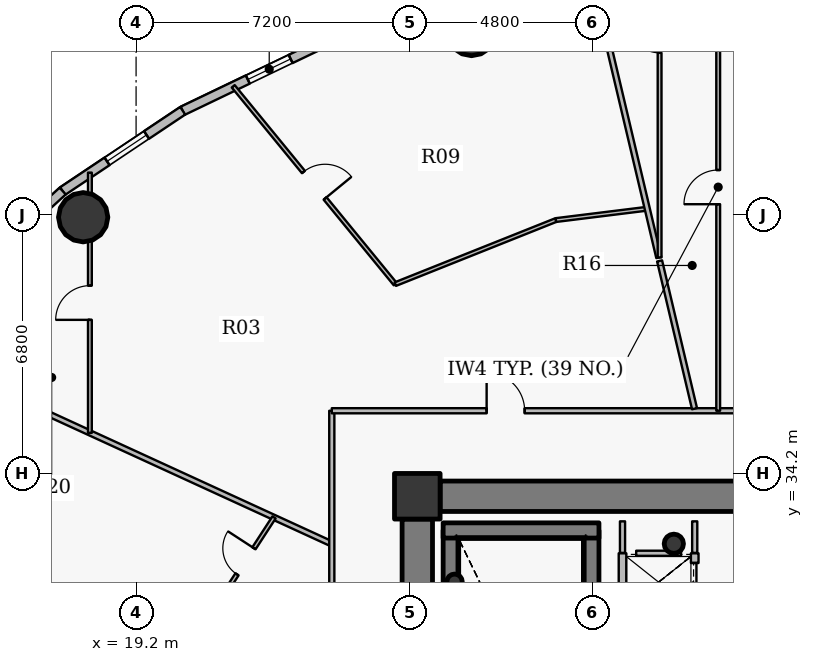
"""IFC4 building model, lengths in metres.
Left out: names, types, materials, properties, quantities, classifications, styles, units other than length and angle.
Written with IfcOpenShell. Run it as: python <this file> out.ifc"""

import sys

from ifc_helpers import new_model, si_unit, direction, frame, frame_2d, origin, origin_2d, place, context, subcontext, project, spatial, rectangle, hollow_circle, extrude, source, transform, mapped, element, fill, save


model = new_model("IFC4")
c1 = context("Model", 3, precision=1e-05, world=origin(), true_north=direction((0.0, 1.0)))
c2 = subcontext(c1, "Body", "Model", "MODEL_VIEW")
j1 = project(units=[si_unit("LENGTHUNIT", "METRE"), si_unit("PLANEANGLEUNIT", "RADIAN")], contexts=[c1])
p1 = place(None, origin())
s1 = spatial("IfcSite", under=j1, at=p1, CompositionType="ELEMENT")
p2 = place(p1, origin())
s2 = spatial("IfcBuilding", under=s1, at=p2, CompositionType="ELEMENT")
p3 = place(p2, frame((0.0, 0.0, 159.9)))
s3 = spatial("IfcBuildingStorey", under=s2, at=p3, CompositionType="ELEMENT", Elevation=159.9)
p4 = place(p3, frame((26.6, 33.6, 0.0), z_axis=(0.0, 0.0, 1.0), x_axis=(1.0, 0.0, 0.0)))
e1 = element("IfcColumn", 1, at=p4, inside=s3, PredefinedType="COLUMN", context=c2, shape_type="SweptSolid", body=[
    extrude(rectangle(XDim=1.2, YDim=1.2, at=origin_2d()), origin(), (0.0, 0.0, 1.0), 3.75),
])
p5 = place(p3, frame((33.35, 32.35, 0.0), z_axis=(0.0, 0.0, 1.0), x_axis=(1.0, 0.0, 0.0)))
e2 = element("IfcColumn", 2, at=p5, inside=s3, PredefinedType="COLUMN", context=c2, shape_type="SweptSolid", body=[
    extrude(hollow_circle(Radius=0.254, WallThickness=0.02, at=origin_2d()), origin(), (0.0, 0.0, 1.0), 3.75),
])
p6 = place(p3, frame((27.48, 24.1, 0.0), z_axis=(0.0, 0.0, 1.0), x_axis=(0.0, 1.0, 0.0)))
e3 = element("IfcWall", 3, at=p6, inside=s3, PredefinedType="SHEAR", context=c2, shape_type="SweptSolid", body=[
    extrude(rectangle(XDim=8.6, YDim=0.4, at=frame_2d((4.3, 0.0))), origin(), (0.0, 0.0, 1.0), 3.75),
])
p7 = place(p3, frame((31.18, 27.8, 0.0), z_axis=(0.0, 0.0, 1.0), x_axis=(0.0, 1.0, 0.0)))
e4 = element("IfcWall", 4, at=p7, inside=s3, PredefinedType="SHEAR", context=c2, shape_type="SweptSolid", body=[
    extrude(rectangle(XDim=4.9, YDim=0.4, at=frame_2d((2.45, 0.0))), origin(), (0.0, 0.0, 1.0), 3.75),
])
p8 = place(p3, frame((27.28, 32.7, 0.0), z_axis=(0.0, 0.0, 1.0), x_axis=(1.0, 0.0, 0.0)))
e5 = element("IfcWall", 5, at=p8, inside=s3, PredefinedType="SHEAR", context=c2, shape_type="SweptSolid", body=[
    extrude(rectangle(XDim=4.1, YDim=0.4, at=frame_2d((2.05, 0.0))), origin(), (0.0, 0.0, 1.0), 3.75),
])
p9 = place(p3, frame((27.58, 31.35, 0.0), z_axis=(0.0, 0.0, 1.0), x_axis=(1.0, 0.0, 0.0)))
e6 = element("IfcColumn", 6, at=p9, inside=s3, PredefinedType="COLUMN", context=c2, shape_type="SweptSolid", body=[
    extrude(hollow_circle(Radius=0.203, WallThickness=0.016, at=origin_2d()), origin(), (0.0, 0.0, 1.0), 3.75),
])
p10 = place(p3, frame((27.2, 33.6, 0.0), z_axis=(0.0, 0.0, 1.0), x_axis=(1.0, 0.0, 0.0)))
e7 = element("IfcWall", 7, at=p10, inside=s3, PredefinedType="SHEAR", context=c2, shape_type="SweptSolid", body=[
    extrude(rectangle(XDim=17.6, YDim=0.8, at=frame_2d((8.8, 0.0))), origin(), (0.0, 0.0, 1.0), 2.95),
])
p11 = place(p10, frame((13.45, 0.0, 0.0)))
e8 = element("IfcOpeningElement", 8, at=p11, cuts=e7, PredefinedType="OPENING", context=c2, shape_type="SweptSolid", body=[
    extrude(rectangle(XDim=1.15, YDim=2.15, at=origin_2d()), frame((0.575, 0.41, 1.075), z_axis=(0.0, -1.0, 0.0), x_axis=(1.0, 0.0, 0.0)), (0.0, 0.0, 1.0), 0.82),
])
p12 = place(p3, frame((26.6, 21.0, 0.0), z_axis=(0.0, 0.0, 1.0), x_axis=(0.0, 1.0, 0.0)))
e9 = element("IfcWall", 9, at=p12, inside=s3, PredefinedType="SHEAR", context=c2, shape_type="SweptSolid", body=[
    extrude(rectangle(XDim=12.0, YDim=0.8, at=frame_2d((6.0, 0.0))), origin(), (0.0, 0.0, 1.0), 2.95),
])
p13 = place(p12, frame((1.061, 0.0, 0.0)))
e10 = element("IfcOpeningElement", 10, at=p13, cuts=e9, PredefinedType="OPENING", context=c2, shape_type="SweptSolid", body=[
    extrude(rectangle(XDim=1.15, YDim=2.15, at=origin_2d()), frame((0.575, 0.41, 1.075), z_axis=(0.0, -1.0, 0.0), x_axis=(1.0, 0.0, 0.0)), (0.0, 0.0, 1.0), 0.82),
])
for number, where, z_axis, x_axis in (
    (11, (28.027, 45.841, 0.0), (0.0, 0.0, 1.0), (1.0, 0.0, 0.0)),
    (12, (17.808, 40.942, 0.0), (0.0, 0.0, 1.0), (1.0, 0.0, 0.0)),
):
    element("IfcColumn", number, at=place(p3, frame(where, z_axis=z_axis, x_axis=x_axis)), inside=s3, PredefinedType="COLUMN", context=c2, shape_type="SweptSolid", body=[
        extrude(hollow_circle(Radius=0.65, WallThickness=0.04, at=origin_2d()), origin(), (0.0, 0.0, 1.0), 3.75),
    ])
p14 = place(p3, frame((20.427, 43.743, 0.0), z_axis=(0.0, 0.0, 1.0), x_axis=(0.901564733809, 0.432644231155, 0.0)))
e13 = element("IfcWall", 13, at=p14, inside=s3, PredefinedType="SOLIDWALL", context=c2, shape_type="SweptSolid", body=[
    extrude(rectangle(XDim=3.93, YDim=0.24, at=frame_2d((1.965, 0.0))), origin(), (0.0, 0.0, 1.0), 3.5),
])
p15 = place(p14, frame((1.9, 0.0, 0.9)))
e14 = element("IfcOpeningElement", 14, at=p15, cuts=e13, PredefinedType="OPENING", context=c2, shape_type="SweptSolid", body=[
    extrude(rectangle(XDim=1.25, YDim=1.65, at=origin_2d()), frame((0.625, 0.13, 0.825), z_axis=(0.0, -1.0, 0.0), x_axis=(1.0, 0.0, 0.0)), (0.0, 0.0, 1.0), 0.26),
])
p16 = place(p3, frame((17.268, 41.631, 0.0), z_axis=(0.0, 0.0, 1.0), x_axis=(0.831228998277, 0.555930168657, 0.0)))
e15 = element("IfcWall", 15, at=p16, inside=s3, PredefinedType="SOLIDWALL", context=c2, shape_type="SweptSolid", body=[
    extrude(rectangle(XDim=3.8, YDim=0.24, at=frame_2d((1.9, 0.0))), origin(), (0.0, 0.0, 1.0), 3.5),
])
p17 = place(p16, frame((1.405, 0.0, 0.9)))
e16 = element("IfcOpeningElement", 16, at=p17, cuts=e15, PredefinedType="OPENING", context=c2, shape_type="SweptSolid", body=[
    extrude(rectangle(XDim=1.25, YDim=1.65, at=origin_2d()), frame((0.625, 0.13, 0.825), z_axis=(0.0, -1.0, 0.0), x_axis=(1.0, 0.0, 0.0)), (0.0, 0.0, 1.0), 0.26),
])
p18 = place(p3, frame((14.572, 39.158, 0.0), z_axis=(0.0, 0.0, 1.0), x_axis=(0.737076565834, 0.675809245349, 0.0)))
e17 = element("IfcWall", 17, at=p18, inside=s3, PredefinedType="SOLIDWALL", context=c2, shape_type="SweptSolid", body=[
    extrude(rectangle(XDim=3.658, YDim=0.24, at=frame_2d((1.829, 0.0))), origin(), (0.0, 0.0, 1.0), 3.5),
])
p19 = place(p3, frame((13.229, 37.45, 0.0), z_axis=(0.0, 0.0, 1.0), x_axis=(0.908867611309, -0.417084721746, 0.0)))
e18 = element("IfcWall", 18, at=p19, inside=s3, PredefinedType="PARTITIONING", context=c2, shape_type="SweptSolid", body=[
    extrude(rectangle(XDim=12.237, YDim=0.135, at=frame_2d((6.118, 0.0))), origin(), (0.0, 0.0, 1.0), 2.935),
])
p20 = place(p3, frame((17.984, 35.267, 0.0), z_axis=(0.0, 0.0, 1.0), x_axis=(0.0, 1.0, 0.0)))
e19 = element("IfcWall", 19, at=p20, inside=s3, PredefinedType="PARTITIONING", context=c2, shape_type="SweptSolid", body=[
    extrude(rectangle(XDim=6.848, YDim=0.1, at=frame_2d((3.424, 0.0))), origin(), (0.0, 0.0, 1.0), 2.935),
])
p21 = place(p20, frame((2.974, 0.0, 0.0)))
e20 = element("IfcOpeningElement", 20, at=p21, cuts=e19, PredefinedType="OPENING", context=c2, shape_type="SweptSolid", body=[
    extrude(rectangle(XDim=0.9, YDim=2.1, at=origin_2d()), frame((0.45, 0.06, 1.05), z_axis=(0.0, -1.0, 0.0), x_axis=(1.0, 0.0, 0.0)), (0.0, 0.0, 1.0), 0.12),
])
p22 = place(p3, frame((21.327, 30.733, 0.0), z_axis=(0.0, 0.0, 1.0), x_axis=(0.545365017792, 0.838198662233, 0.0)))
e21 = element("IfcWall", 21, at=p22, inside=s3, PredefinedType="PARTITIONING", context=c2, shape_type="SweptSolid", body=[
    extrude(rectangle(XDim=2.756, YDim=0.1, at=frame_2d((1.378, 0.0))), origin(), (0.0, 0.0, 1.0), 2.935),
])
p23 = place(p22, frame((0.968, 0.0, 0.0)))
e22 = element("IfcOpeningElement", 22, at=p23, cuts=e21, PredefinedType="OPENING", context=c2, shape_type="SweptSolid", body=[
    extrude(rectangle(XDim=0.82, YDim=2.1, at=origin_2d()), frame((0.41, 0.06, 1.05), z_axis=(0.0, -1.0, 0.0), x_axis=(1.0, 0.0, 0.0)), (0.0, 0.0, 1.0), 0.12),
])
p24 = place(p3, frame((21.756, 44.387, 0.0), z_axis=(0.0, 0.0, 1.0), x_axis=(0.633727642201, -0.773556252325, 0.0)))
e23 = element("IfcWall", 23, at=p24, inside=s3, PredefinedType="PARTITIONING", context=c2, shape_type="SweptSolid", body=[
    extrude(rectangle(XDim=6.729, YDim=0.1, at=frame_2d((3.365, 0.0))), origin(), (0.0, 0.0, 1.0), 2.935),
])
p25 = place(p24, frame((2.915, 0.0, 0.0)))
e24 = element("IfcOpeningElement", 24, at=p25, cuts=e23, PredefinedType="OPENING", context=c2, shape_type="SweptSolid", body=[
    extrude(rectangle(XDim=0.9, YDim=2.1, at=origin_2d()), frame((0.45, 0.06, 1.05), z_axis=(0.0, -1.0, 0.0), x_axis=(1.0, 0.0, 0.0)), (0.0, 0.0, 1.0), 0.12),
])
p26 = place(p3, frame((24.35, 27.95, 0.0), z_axis=(0.0, 0.0, 1.0), x_axis=(0.0, 1.0, 0.0)))
e25 = element("IfcWall", 25, at=p26, inside=s3, PredefinedType="PARTITIONING", context=c2, shape_type="SweptSolid", body=[
    extrude(rectangle(XDim=7.9, YDim=0.135, at=frame_2d((3.95, 0.0))), origin(), (0.0, 0.0, 1.0), 2.935),
])
p27 = place(p3, frame((24.35, 35.85, 0.0), z_axis=(0.0, 0.0, 1.0), x_axis=(1.0, 0.0, 0.0)))
e26 = element("IfcWall", 26, at=p27, inside=s3, PredefinedType="PARTITIONING", context=c2, shape_type="SweptSolid", body=[
    extrude(rectangle(XDim=29.104, YDim=0.135, at=frame_2d((14.552, 0.0))), origin(), (0.0, 0.0, 1.0), 2.935),
])
p28 = place(p27, frame((15.972, 0.0, 0.0)))
e27 = element("IfcOpeningElement", 27, at=p28, cuts=e26, PredefinedType="OPENING", context=c2, shape_type="SweptSolid", body=[
    extrude(rectangle(XDim=1.0, YDim=2.15, at=origin_2d()), frame((0.5, 0.078, 1.075), z_axis=(0.0, -1.0, 0.0), x_axis=(1.0, 0.0, 0.0)), (0.0, 0.0, 1.0), 0.155),
])
p29 = place(p27, frame((4.074, 0.0, 0.0)))
e28 = element("IfcOpeningElement", 28, at=p29, cuts=e26, PredefinedType="OPENING", context=c2, shape_type="SweptSolid", body=[
    extrude(rectangle(XDim=1.0, YDim=2.15, at=origin_2d()), frame((0.5, 0.078, 1.075), z_axis=(0.0, -1.0, 0.0), x_axis=(1.0, 0.0, 0.0)), (0.0, 0.0, 1.0), 0.155),
])
p30 = place(p3, frame((26.021, 39.181, 0.0), z_axis=(0.0, 0.0, 1.0), x_axis=(0.928787254853, 0.37061332305, 0.0)))
e29 = element("IfcWall", 29, at=p30, inside=s3, PredefinedType="PARTITIONING", context=c2, shape_type="SweptSolid", body=[
    extrude(rectangle(XDim=4.549, YDim=0.1, at=frame_2d((2.275, 0.0))), origin(), (0.0, 0.0, 1.0), 2.935),
])
p31 = place(p3, frame((30.246, 40.867, 0.0), z_axis=(0.0, 0.0, 1.0), x_axis=(0.99240598239, 0.123005553192, 0.0)))
e30 = element("IfcWall", 30, at=p31, inside=s3, PredefinedType="PARTITIONING", context=c2, shape_type="SweptSolid", body=[
    extrude(rectangle(XDim=2.423, YDim=0.1, at=frame_2d((1.212, 0.0))), origin(), (0.0, 0.0, 1.0), 2.935),
])
p32 = place(p3, frame((31.194, 47.33, 0.0), z_axis=(0.0, 0.0, 1.0), x_axis=(0.230064999041, -0.973175264902, 0.0)))
e31 = element("IfcWall", 31, at=p32, inside=s3, PredefinedType="PARTITIONING", context=c2, shape_type="SweptSolid", body=[
    extrude(rectangle(XDim=7.654, YDim=0.135, at=frame_2d((3.827, 0.0))), origin(), (0.0, 0.0, 1.0), 2.935),
])
p33 = place(p3, frame((32.0, 24.1, 0.0), z_axis=(0.0, 0.0, 1.0), x_axis=(0.0, 1.0, 0.0)))
e32 = element("IfcWall", 32, at=p33, inside=s3, PredefinedType="PARTITIONING", context=c2, shape_type="SweptSolid", body=[
    extrude(rectangle(XDim=8.0, YDim=0.2, at=frame_2d((4.0, 0.0))), origin(), (0.0, 0.0, 1.0), 3.5),
])
p34 = place(p3, frame((32.976, 39.792, 0.0), z_axis=(0.0, 0.0, 1.0), x_axis=(0.230050705958, -0.973178643769, 0.0)))
e33 = element("IfcWall", 33, at=p34, inside=s3, PredefinedType="PARTITIONING", context=c2, shape_type="SweptSolid", body=[
    extrude(rectangle(XDim=3.996, YDim=0.135, at=frame_2d((1.998, 0.0))), origin(), (0.0, 0.0, 1.0), 3.5),
])
p35 = place(p3, frame((32.976, 39.884, 0.0), z_axis=(0.0, 0.0, 1.0), x_axis=(0.0, 1.0, 0.0)))
e34 = element("IfcWall", 34, at=p35, inside=s3, PredefinedType="PARTITIONING", context=c2, shape_type="SweptSolid", body=[
    extrude(rectangle(XDim=7.64, YDim=0.1, at=frame_2d((3.82, 0.0))), origin(), (0.0, 0.0, 1.0), 2.935),
])
p36 = place(p35, frame((5.384, 0.0, 0.0)))
e35 = element("IfcOpeningElement", 35, at=p36, cuts=e34, PredefinedType="OPENING", context=c2, shape_type="SweptSolid", body=[
    extrude(rectangle(XDim=0.82, YDim=2.1, at=origin_2d()), frame((0.41, 0.06, 1.05), z_axis=(0.0, -1.0, 0.0), x_axis=(1.0, 0.0, 0.0)), (0.0, 0.0, 1.0), 0.12),
])
p37 = place(p3, frame((33.9, 20.8, 0.0), z_axis=(0.0, 0.0, 1.0), x_axis=(0.0, 1.0, 0.0)))
e36 = element("IfcWall", 36, at=p37, inside=s3, PredefinedType="PARTITIONING", context=c2, shape_type="SweptSolid", body=[
    extrude(rectangle(XDim=11.3, YDim=0.2, at=frame_2d((5.65, 0.0))), origin(), (0.0, 0.0, 1.0), 3.085),
])
p38 = place(p37, frame((6.98, 0.0, 0.0)))
e37 = element("IfcOpeningElement", 37, at=p38, cuts=e36, PredefinedType="OPENING", context=c2, shape_type="SweptSolid", body=[
    extrude(rectangle(XDim=1.05, YDim=2.15, at=origin_2d()), frame((0.525, 0.11, 1.075), z_axis=(0.0, -1.0, 0.0), x_axis=(1.0, 0.0, 0.0)), (0.0, 0.0, 1.0), 0.22),
])
p39 = place(p37, frame((8.495, 0.0, 0.0)))
e38 = element("IfcOpeningElement", 38, at=p39, cuts=e36, PredefinedType="OPENING", context=c2, shape_type="SweptSolid", body=[
    extrude(rectangle(XDim=1.05, YDim=2.15, at=origin_2d()), frame((0.525, 0.11, 1.075), z_axis=(0.0, -1.0, 0.0), x_axis=(1.0, 0.0, 0.0)), (0.0, 0.0, 1.0), 0.22),
])
p40 = place(p37, frame((9.995, 0.0, 0.0)))
e39 = element("IfcOpeningElement", 39, at=p40, cuts=e36, PredefinedType="OPENING", context=c2, shape_type="SweptSolid", body=[
    extrude(rectangle(XDim=1.05, YDim=2.15, at=origin_2d()), frame((0.525, 0.11, 1.075), z_axis=(0.0, -1.0, 0.0), x_axis=(1.0, 0.0, 0.0)), (0.0, 0.0, 1.0), 0.22),
])
p41 = place(p3, frame((34.518, 35.85, 0.0), z_axis=(0.0, 0.0, 1.0), x_axis=(0.0, 1.0, 0.0)))
e40 = element("IfcWall", 40, at=p41, inside=s3, PredefinedType="PARTITIONING", context=c2, shape_type="SweptSolid", body=[
    extrude(rectangle(XDim=11.769, YDim=0.1, at=frame_2d((5.884, 0.0))), origin(), (0.0, 0.0, 1.0), 2.935),
])
p42 = place(p41, frame((5.434, 0.0, 0.0)))
e41 = element("IfcOpeningElement", 41, at=p42, cuts=e40, PredefinedType="OPENING", context=c2, shape_type="SweptSolid", body=[
    extrude(rectangle(XDim=0.9, YDim=2.1, at=origin_2d()), frame((0.45, 0.06, 1.05), z_axis=(0.0, -1.0, 0.0), x_axis=(1.0, 0.0, 0.0)), (0.0, 0.0, 1.0), 0.12),
])
p43 = place(p3, frame((32.36, 32.1, 0.0), z_axis=(0.0, 0.0, 1.0), x_axis=(1.0, 0.0, 0.0)))
e42 = element("IfcWall", 42, at=p43, inside=s3, PredefinedType="PARTITIONING", context=c2, shape_type="SweptSolid", body=[
    extrude(rectangle(XDim=1.18, YDim=0.135, at=frame_2d((0.59, 0.0))), origin(), (0.0, 0.0, 1.0), 3.085),
])
p44 = place(p3, frame((32.0, 32.94, 0.0), z_axis=(0.0, 0.0, 1.0), x_axis=(0.0, -1.0, 0.0)))
e43 = element("IfcWall", 43, at=p44, inside=s3, PredefinedType="PARTITIONING", context=c2, shape_type="SweptSolid", body=[
    extrude(rectangle(XDim=0.83, YDim=0.135, at=frame_2d((0.415, 0.0))), origin(), (0.0, 0.0, 1.0), 3.035),
])
p45 = place(p3, frame((33.9, 32.11, 0.0), z_axis=(0.0, 0.0, 1.0), x_axis=(0.0, 1.0, 0.0)))
e44 = element("IfcWall", 44, at=p45, inside=s3, PredefinedType="PARTITIONING", context=c2, shape_type="SweptSolid", body=[
    extrude(rectangle(XDim=0.83, YDim=0.135, at=frame_2d((0.415, 0.0))), origin(), (0.0, 0.0, 1.0), 3.085),
])
p46 = place(p3, frame((27.19, 34.0, 0.0), z_axis=(0.0, 0.0, 1.0), x_axis=(-1.0, 0.0, 0.0)))
e45 = element("IfcWall", 45, at=p46, inside=s3, PredefinedType="PARTITIONING", context=c2, shape_type="SweptSolid", body=[
    extrude(rectangle(XDim=0.99, YDim=0.135, at=frame_2d((0.495, 0.0))), origin(), (0.0, 0.0, 1.0), 2.935),
])
p47 = place(p3, frame((26.2, 33.692, 0.0), z_axis=(0.0, 0.0, 1.0), x_axis=(0.0, -1.0, 0.0)))
e46 = element("IfcWall", 46, at=p47, inside=s3, PredefinedType="PARTITIONING", context=c2, shape_type="SweptSolid", body=[
    extrude(rectangle(XDim=0.682, YDim=0.135, at=frame_2d((0.341, 0.0))), origin(), (0.0, 0.0, 1.0), 3.5),
])
m1 = source(origin(), c2, "Body", "SweptSolid", [
    extrude(rectangle(XDim=1.25, YDim=1.65, at=origin_2d()), frame((0.625, 0.03, 0.825), z_axis=(0.0, -1.0, 0.0), x_axis=(1.0, 0.0, 0.0)), (0.0, 0.0, 1.0), 0.06),
])
p48 = place(p15, origin())
e47 = element("IfcWindow", 47, at=p48, inside=s3, PartitioningType="SINGLE_PANEL", PredefinedType="WINDOW", context=c2, shape_type="MappedRepresentation", body=[
    mapped(m1, transform((0.0, 0.0, 0.0), x_axis=(1.0, 0.0, 0.0), y_axis=(0.0, 1.0, 0.0), z_axis=(0.0, 0.0, 1.0), scale=1.0)),
])
fill(e14, e47)
p49 = place(p17, origin())
e48 = element("IfcWindow", 48, at=p49, inside=s3, PartitioningType="SINGLE_PANEL", PredefinedType="WINDOW", context=c2, shape_type="MappedRepresentation", body=[
    mapped(m1, transform((0.0, 0.0, 0.0), x_axis=(1.0, 0.0, 0.0), y_axis=(0.0, 1.0, 0.0), z_axis=(0.0, 0.0, 1.0), scale=1.0)),
])
fill(e16, e48)
m2 = source(origin(), c2, "Body", "SweptSolid", [
    extrude(rectangle(XDim=1.05, YDim=2.15, at=origin_2d()), frame((0.525, 0.025, 1.075), z_axis=(0.0, -1.0, 0.0), x_axis=(1.0, 0.0, 0.0)), (0.0, 0.0, 1.0), 0.05),
])
p50 = place(p40, origin())
e49 = element("IfcDoor", 49, at=p50, inside=s3, OperationType="DOUBLE_DOOR_SLIDING", PredefinedType="USERDEFINED", context=c2, shape_type="MappedRepresentation", body=[
    mapped(m2, transform((0.0, 0.0, 0.0), x_axis=(1.0, 0.0, 0.0), y_axis=(0.0, 1.0, 0.0), z_axis=(0.0, 0.0, 1.0), scale=1.0)),
])
fill(e39, e49)
m3 = source(origin(), c2, "Body", "SweptSolid", [
    extrude(rectangle(XDim=0.9, YDim=2.1, at=origin_2d()), frame((0.45, 0.025, 1.05), z_axis=(0.0, -1.0, 0.0), x_axis=(1.0, 0.0, 0.0)), (0.0, 0.0, 1.0), 0.05),
])
p51 = place(p42, origin())
e50 = element("IfcDoor", 50, at=p51, inside=s3, OperationType="SINGLE_SWING_LEFT", PredefinedType="DOOR", context=c2, shape_type="MappedRepresentation", body=[
    mapped(m3, transform((0.0, 0.0, 0.0), x_axis=(1.0, 0.0, 0.0), y_axis=(0.0, 1.0, 0.0), z_axis=(0.0, 0.0, 1.0), scale=1.0)),
])
fill(e41, e50)
m4 = source(origin(), c2, "Body", "SweptSolid", [
    extrude(rectangle(XDim=0.82, YDim=2.1, at=origin_2d()), frame((0.41, 0.025, 1.05), z_axis=(0.0, -1.0, 0.0), x_axis=(1.0, 0.0, 0.0)), (0.0, 0.0, 1.0), 0.05),
])
p52 = place(p36, origin())
e51 = element("IfcDoor", 51, at=p52, inside=s3, OperationType="SINGLE_SWING_RIGHT", PredefinedType="DOOR", context=c2, shape_type="MappedRepresentation", body=[
    mapped(m4, transform((0.0, 0.0, 0.0), x_axis=(1.0, 0.0, 0.0), y_axis=(0.0, 1.0, 0.0), z_axis=(0.0, 0.0, 1.0), scale=1.0)),
])
fill(e35, e51)
m5 = source(origin(), c2, "Body", "SweptSolid", [
    extrude(rectangle(XDim=1.0, YDim=2.15, at=origin_2d()), frame((0.5, 0.025, 1.075), z_axis=(0.0, -1.0, 0.0), x_axis=(1.0, 0.0, 0.0)), (0.0, 0.0, 1.0), 0.05),
])
p53 = place(p29, origin())
e52 = element("IfcDoor", 52, at=p53, inside=s3, OperationType="SINGLE_SWING_LEFT", PredefinedType="DOOR", context=c2, shape_type="MappedRepresentation", body=[
    mapped(m5, transform((0.0, 0.0, 0.0), x_axis=(1.0, 0.0, 0.0), y_axis=(0.0, 1.0, 0.0), z_axis=(0.0, 0.0, 1.0), scale=1.0)),
])
fill(e28, e52)
p54 = place(p25, origin())
e53 = element("IfcDoor", 53, at=p54, inside=s3, OperationType="SINGLE_SWING_RIGHT", PredefinedType="DOOR", context=c2, shape_type="MappedRepresentation", body=[
    mapped(m3, transform((0.0, 0.0, 0.0), x_axis=(1.0, 0.0, 0.0), y_axis=(0.0, 1.0, 0.0), z_axis=(0.0, 0.0, 1.0), scale=1.0)),
])
fill(e24, e53)
p55 = place(p21, origin())
e54 = element("IfcDoor", 54, at=p55, inside=s3, OperationType="SINGLE_SWING_LEFT", PredefinedType="DOOR", context=c2, shape_type="MappedRepresentation", body=[
    mapped(m3, transform((0.0, 0.0, 0.0), x_axis=(1.0, 0.0, 0.0), y_axis=(0.0, 1.0, 0.0), z_axis=(0.0, 0.0, 1.0), scale=1.0)),
])
fill(e20, e54)
p56 = place(p23, origin())
e55 = element("IfcDoor", 55, at=p56, inside=s3, OperationType="SINGLE_SWING_RIGHT", PredefinedType="DOOR", context=c2, shape_type="MappedRepresentation", body=[
    mapped(m4, transform((0.0, 0.0, 0.0), x_axis=(1.0, 0.0, 0.0), y_axis=(0.0, 1.0, 0.0), z_axis=(0.0, 0.0, 1.0), scale=1.0)),
])
fill(e22, e55)
save(model, sys.argv[1])
